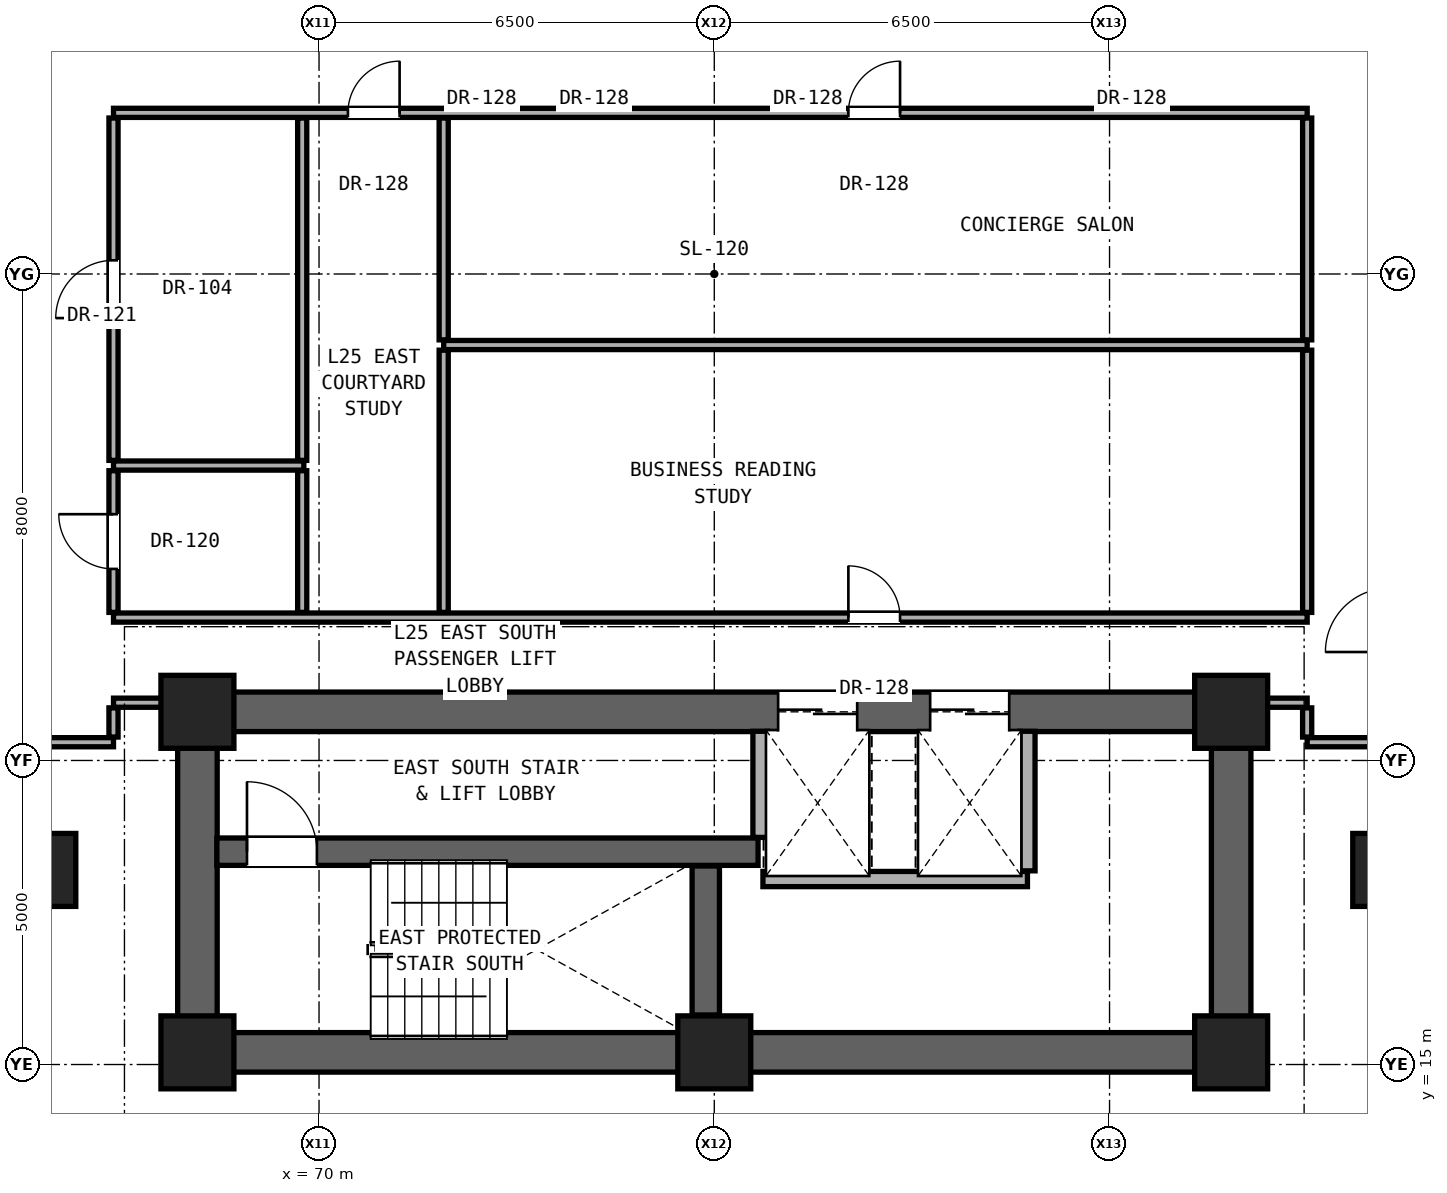
"""IFC4 building model, lengths in metres.
Left out: names, types, materials, properties, quantities, classifications, styles, units other than length and angle.
Written with IfcOpenShell. Run it as: python <this file> out.ifc"""

import sys

from ifc_helpers import new_model, si_unit, direction, frame, frame_2d, origin, origin_2d, place, context, subcontext, project, spatial, rectangle, extrude, element, fill, save


model = new_model("IFC4")
c1 = context("Model", 3, precision=1e-05, world=origin(), true_north=direction((0.0, 1.0)))
c2 = subcontext(c1, "Body", "Model", "MODEL_VIEW")
j1 = project(units=[si_unit("LENGTHUNIT", "METRE"), si_unit("PLANEANGLEUNIT", "RADIAN")], contexts=[c1])
p1 = place(None, origin())
s1 = spatial("IfcSite", under=j1, at=p1, CompositionType="ELEMENT")
p2 = place(p1, origin())
s2 = spatial("IfcBuilding", under=s1, at=p2, CompositionType="ELEMENT")
p3 = place(p2, frame((0.0, 0.0, 91.7)))
s3 = spatial("IfcBuildingStorey", under=s2, at=p3, CompositionType="ELEMENT", Elevation=91.7)
for number, where, z_axis, x_axis in (
    (1, (68.0, 15.2, 0.0), (0.0, 0.0, 1.0), (1.0, 0.0, 0.0)),
    (2, (76.5, 15.2, 0.0), (0.0, 0.0, 1.0), (1.0, 0.0, 0.0)),
    (3, (85.0, 15.2, 0.0), (0.0, 0.0, 1.0), (1.0, 0.0, 0.0)),
    (4, (68.0, 20.8, 0.0), (0.0, 0.0, 1.0), (1.0, 0.0, 0.0)),
    (5, (85.0, 20.8, 0.0), (0.0, 0.0, 1.0), (1.0, 0.0, 0.0)),
):
    element("IfcColumn", number, at=place(p3, frame(where, z_axis=z_axis, x_axis=x_axis)), inside=s3, PredefinedType="COLUMN", context=c2, shape_type="SweptSolid", body=[
        extrude(rectangle(XDim=1.2, YDim=1.2, at=origin_2d()), origin(), (0.0, 0.0, 1.0), 3.3),
    ])
for number, where, z_axis, x_axis in (
    (6, (65.6, 18.2, 0.0), (0.0, 0.0, 1.0), (1.0, 0.0, 0.0)),
    (7, (87.4, 18.2, 0.0), (0.0, 0.0, 1.0), (1.0, 0.0, 0.0)),
):
    element("IfcColumn", number, at=place(p3, frame(where, z_axis=z_axis, x_axis=x_axis)), inside=s3, PredefinedType="PILASTER", context=c2, shape_type="SweptSolid", body=[
        extrude(rectangle(XDim=0.8, YDim=1.2, at=origin_2d()), origin(), (0.0, 0.0, 1.0), 3.3),
    ])
p4 = place(p3, frame((68.0, 15.2, 0.0), z_axis=(0.0, 0.0, 1.0), x_axis=(1.0, 0.0, 0.0)))
e8 = element("IfcWall", 8, at=p4, inside=s3, PredefinedType="SHEAR", context=c2, shape_type="SweptSolid", body=[
    extrude(rectangle(XDim=17.0, YDim=0.65, at=frame_2d((8.5, 0.0))), origin(), (0.0, 0.0, 1.0), 3.08),
])
for number, where, z_axis, x_axis in (
    (9, (68.0, 15.2, 0.0), (0.0, 0.0, 1.0), (0.0, 1.0, 0.0)),
    (10, (85.0, 15.2, 0.0), (0.0, 0.0, 1.0), (0.0, 1.0, 0.0)),
):
    element("IfcWall", number, at=place(p3, frame(where, z_axis=z_axis, x_axis=x_axis)), inside=s3, PredefinedType="SHEAR", context=c2, shape_type="SweptSolid", body=[
        extrude(rectangle(XDim=5.6, YDim=0.65, at=frame_2d((2.8, 0.0))), origin(), (0.0, 0.0, 1.0), 3.08),
    ])
p5 = place(p3, frame((68.0, 20.8, 0.0), z_axis=(0.0, 0.0, 1.0), x_axis=(1.0, 0.0, 0.0)))
e11 = element("IfcWall", 11, at=p5, inside=s3, PredefinedType="SHEAR", context=c2, shape_type="SweptSolid", body=[
    extrude(rectangle(XDim=17.0, YDim=0.65, at=frame_2d((8.5, 0.0))), origin(), (0.0, 0.0, 1.0), 3.08),
])
p6 = place(p5, frame((9.55, 0.0, 0.0)))
e12 = element("IfcOpeningElement", 12, at=p6, cuts=e11, PredefinedType="OPENING", context=c2, shape_type="SweptSolid", body=[
    extrude(rectangle(XDim=1.3, YDim=2.3, at=frame_2d((0.65, 1.15))), frame((0.0, 0.335, 0.0), z_axis=(0.0, -1.0, 0.0), x_axis=(1.0, 0.0, 0.0)), (0.0, 0.0, 1.0), 0.67),
])
p7 = place(p5, frame((12.05, 0.0, 0.0)))
e13 = element("IfcOpeningElement", 13, at=p7, cuts=e11, PredefinedType="OPENING", context=c2, shape_type="SweptSolid", body=[
    extrude(rectangle(XDim=1.3, YDim=2.3, at=frame_2d((0.65, 1.15))), frame((0.0, 0.335, 0.0), z_axis=(0.0, -1.0, 0.0), x_axis=(1.0, 0.0, 0.0)), (0.0, 0.0, 1.0), 0.67),
])
p8 = place(p3, frame((77.3, 18.05, 0.0), z_axis=(0.0, 0.0, 1.0), x_axis=(1.0, 0.0, 0.0)))
e14 = element("IfcWall", 14, at=p8, inside=s3, PredefinedType="SOLIDWALL", context=c2, shape_type="SweptSolid", body=[
    extrude(rectangle(XDim=4.35, YDim=0.25, at=frame_2d((2.175, 0.0))), origin(), (0.0, 0.0, 1.0), 3.08),
])
p9 = place(p3, frame((68.32, 18.5, 0.0), z_axis=(0.0, 0.0, 1.0), x_axis=(1.0, 0.0, 0.0)))
e15 = element("IfcWall", 15, at=p9, inside=s3, PredefinedType="SHEAR", context=c2, shape_type="SweptSolid", body=[
    extrude(rectangle(XDim=8.9, YDim=0.45, at=frame_2d((4.45, 0.0))), origin(), (0.0, 0.0, 1.0), 3.08),
])
p10 = place(p9, frame((0.495, 0.0, 0.0)))
e16 = element("IfcOpeningElement", 16, at=p10, cuts=e15, PredefinedType="OPENING", context=c2, shape_type="SweptSolid", body=[
    extrude(rectangle(XDim=1.15, YDim=2.2, at=frame_2d((0.575, 1.1))), frame((0.0, 0.235, 0.0), z_axis=(0.0, -1.0, 0.0), x_axis=(1.0, 0.0, 0.0)), (0.0, 0.0, 1.0), 0.47),
])
p11 = place(p3, frame((65.25, 20.3, 0.0), z_axis=(0.0, 0.0, 1.0), x_axis=(1.0, 0.0, 0.0)))
e17 = element("IfcWall", 17, at=p11, inside=s3, PredefinedType="PARTITIONING", context=c2, shape_type="SweptSolid", body=[
    extrude(rectangle(XDim=1.37, YDim=0.15, at=frame_2d((0.685, 0.0))), origin(), (0.0, 0.0, 1.0), 3.08),
])
p12 = place(p3, frame((86.25, 20.3, 0.0), z_axis=(0.0, 0.0, 1.0), x_axis=(1.0, 0.0, 0.0)))
e18 = element("IfcWall", 18, at=p12, inside=s3, PredefinedType="PARTITIONING", context=c2, shape_type="SweptSolid", body=[
    extrude(rectangle(XDim=1.35, YDim=0.15, at=frame_2d((0.675, 0.0))), origin(), (0.0, 0.0, 1.0), 3.08),
])
p13 = place(p3, frame((66.62, 20.95, 0.0), z_axis=(0.0, 0.0, 1.0), x_axis=(1.0, 0.0, 0.0)))
e19 = element("IfcWall", 19, at=p13, inside=s3, PredefinedType="PARTITIONING", context=c2, shape_type="SweptSolid", body=[
    extrude(rectangle(XDim=1.06, YDim=0.15, at=frame_2d((0.53, 0.0))), origin(), (0.0, 0.0, 1.0), 2.472),
])
p14 = place(p3, frame((85.32, 20.95, 0.0), z_axis=(0.0, 0.0, 1.0), x_axis=(1.0, 0.0, 0.0)))
e20 = element("IfcWall", 20, at=p14, inside=s3, PredefinedType="PARTITIONING", context=c2, shape_type="SweptSolid", body=[
    extrude(rectangle(XDim=0.93, YDim=0.15, at=frame_2d((0.465, 0.0))), origin(), (0.0, 0.0, 1.0), 2.472),
])
p15 = place(p3, frame((66.62, 22.35, 0.0), z_axis=(0.0, 0.0, 1.0), x_axis=(1.0, 0.0, 0.0)))
e21 = element("IfcWall", 21, at=p15, inside=s3, PredefinedType="PARTITIONING", context=c2, shape_type="SweptSolid", body=[
    extrude(rectangle(XDim=19.63, YDim=0.15, at=frame_2d((9.815, 0.0))), origin(), (0.0, 0.0, 1.0), 2.145),
])
p16 = place(p15, frame((12.085, 0.0, 0.0)))
e22 = element("IfcOpeningElement", 22, at=p16, cuts=e21, PredefinedType="OPENING", context=c2, shape_type="SweptSolid", body=[
    extrude(rectangle(XDim=0.85, YDim=2.01, at=frame_2d((0.425, 1.005))), frame((0.0, 0.085, 0.0), z_axis=(0.0, -1.0, 0.0), x_axis=(1.0, 0.0, 0.0)), (0.0, 0.0, 1.0), 0.17),
])
p17 = place(p3, frame((66.62, 24.85, 0.0), z_axis=(0.0, 0.0, 1.0), x_axis=(1.0, 0.0, 0.0)))
e23 = element("IfcWall", 23, at=p17, inside=s3, PredefinedType="PARTITIONING", context=c2, shape_type="SweptSolid", body=[
    extrude(rectangle(XDim=3.13, YDim=0.15, at=frame_2d((1.565, 0.0))), origin(), (0.0, 0.0, 1.0), 2.145),
])
p18 = place(p3, frame((72.05, 26.832, 0.0), z_axis=(0.0, 0.0, 1.0), x_axis=(1.0, 0.0, 0.0)))
e24 = element("IfcWall", 24, at=p18, inside=s3, PredefinedType="PARTITIONING", context=c2, shape_type="SweptSolid", body=[
    extrude(rectangle(XDim=14.2, YDim=0.15, at=frame_2d((7.1, 0.0))), origin(), (0.0, 0.0, 1.0), 2.145),
])
p19 = place(p3, frame((66.62, 30.65, 0.0), z_axis=(0.0, 0.0, 1.0), x_axis=(1.0, 0.0, 0.0)))
e25 = element("IfcWall", 25, at=p19, inside=s3, PredefinedType="PARTITIONING", context=c2, shape_type="SweptSolid", body=[
    extrude(rectangle(XDim=19.63, YDim=0.15, at=frame_2d((9.815, 0.0))), origin(), (0.0, 0.0, 1.0), 2.145),
])
p20 = place(p19, frame((3.855, 0.0, 0.0)))
e26 = element("IfcOpeningElement", 26, at=p20, cuts=e25, PredefinedType="OPENING", context=c2, shape_type="SweptSolid", body=[
    extrude(rectangle(XDim=0.85, YDim=2.01, at=frame_2d((0.425, 1.005))), frame((0.0, 0.085, 0.0), z_axis=(0.0, -1.0, 0.0), x_axis=(1.0, 0.0, 0.0)), (0.0, 0.0, 1.0), 0.17),
])
p21 = place(p19, frame((12.085, 0.0, 0.0)))
e27 = element("IfcOpeningElement", 27, at=p21, cuts=e25, PredefinedType="OPENING", context=c2, shape_type="SweptSolid", body=[
    extrude(rectangle(XDim=0.85, YDim=2.01, at=frame_2d((0.425, 1.005))), frame((0.0, 0.085, 0.0), z_axis=(0.0, -1.0, 0.0), x_axis=(1.0, 0.0, 0.0)), (0.0, 0.0, 1.0), 0.17),
])
p22 = place(p3, frame((66.62, 20.385, 0.0), z_axis=(0.0, 0.0, 1.0), x_axis=(0.0, 1.0, 0.0)))
e28 = element("IfcWall", 28, at=p22, inside=s3, PredefinedType="PARTITIONING", context=c2, shape_type="SweptSolid", body=[
    extrude(rectangle(XDim=0.48, YDim=0.15, at=frame_2d((0.24, 0.0))), origin(), (0.0, 0.0, 1.0), 2.472),
])
p23 = place(p3, frame((66.62, 22.435, 0.0), z_axis=(0.0, 0.0, 1.0), x_axis=(0.0, 1.0, 0.0)))
e29 = element("IfcWall", 29, at=p23, inside=s3, PredefinedType="PARTITIONING", context=c2, shape_type="SweptSolid", body=[
    extrude(rectangle(XDim=2.33, YDim=0.15, at=frame_2d((1.165, 0.0))), origin(), (0.0, 0.0, 1.0), 3.08),
])
p24 = place(p23, frame((0.715, 0.0, 0.0)))
e30 = element("IfcOpeningElement", 30, at=p24, cuts=e29, PredefinedType="OPENING", context=c2, shape_type="SweptSolid", body=[
    extrude(rectangle(XDim=0.9, YDim=2.1, at=frame_2d((0.45, 1.05))), frame((0.0, 0.085, 0.0), z_axis=(0.0, -1.0, 0.0), x_axis=(1.0, 0.0, 0.0)), (0.0, 0.0, 1.0), 0.17),
])
p25 = place(p3, frame((66.62, 24.935, 0.0), z_axis=(0.0, 0.0, 1.0), x_axis=(0.0, 1.0, 0.0)))
e31 = element("IfcWall", 31, at=p25, inside=s3, PredefinedType="PARTITIONING", context=c2, shape_type="SweptSolid", body=[
    extrude(rectangle(XDim=5.63, YDim=0.15, at=frame_2d((2.815, 0.0))), origin(), (0.0, 0.0, 1.0), 2.299),
])
p26 = place(p25, frame((2.34, 0.0, 0.0)))
e32 = element("IfcOpeningElement", 32, at=p26, cuts=e31, PredefinedType="OPENING", context=c2, shape_type="SweptSolid", body=[
    extrude(rectangle(XDim=0.95, YDim=2.15, at=frame_2d((0.475, 1.075))), frame((0.0, 0.085, 0.0), z_axis=(0.0, -1.0, 0.0), x_axis=(1.0, 0.0, 0.0)), (0.0, 0.0, 1.0), 0.17),
])
p27 = place(p3, frame((69.723, 22.435, 0.0), z_axis=(0.0, 0.0, 1.0), x_axis=(0.0, 1.0, 0.0)))
e33 = element("IfcWall", 33, at=p27, inside=s3, PredefinedType="PARTITIONING", context=c2, shape_type="SweptSolid", body=[
    extrude(rectangle(XDim=2.33, YDim=0.15, at=frame_2d((1.165, 0.0))), origin(), (0.0, 0.0, 1.0), 3.08),
])
p28 = place(p3, frame((69.723, 24.935, 0.0), z_axis=(0.0, 0.0, 1.0), x_axis=(0.0, 1.0, 0.0)))
e34 = element("IfcWall", 34, at=p28, inside=s3, PredefinedType="PARTITIONING", context=c2, shape_type="SweptSolid", body=[
    extrude(rectangle(XDim=5.63, YDim=0.15, at=frame_2d((2.815, 0.0))), origin(), (0.0, 0.0, 1.0), 2.145),
])
p29 = place(p3, frame((72.05, 22.435, 0.0), z_axis=(0.0, 0.0, 1.0), x_axis=(0.0, 1.0, 0.0)))
e35 = element("IfcWall", 35, at=p29, inside=s3, PredefinedType="PARTITIONING", context=c2, shape_type="SweptSolid", body=[
    extrude(rectangle(XDim=4.312, YDim=0.15, at=frame_2d((2.156, 0.0))), origin(), (0.0, 0.0, 1.0), 2.609),
])
p30 = place(p3, frame((72.05, 26.917, 0.0), z_axis=(0.0, 0.0, 1.0), x_axis=(0.0, 1.0, 0.0)))
e36 = element("IfcWall", 36, at=p30, inside=s3, PredefinedType="PARTITIONING", context=c2, shape_type="SweptSolid", body=[
    extrude(rectangle(XDim=3.648, YDim=0.15, at=frame_2d((1.824, 0.0))), origin(), (0.0, 0.0, 1.0), 2.145),
])
p31 = place(p3, frame((76.36, 15.815, 0.0), z_axis=(0.0, 0.0, 1.0), x_axis=(0.0, 1.0, 0.0)))
e37 = element("IfcWall", 37, at=p31, inside=s3, PredefinedType="SHEAR", context=c2, shape_type="SweptSolid", body=[
    extrude(rectangle(XDim=2.45, YDim=0.45, at=frame_2d((1.225, 0.0))), origin(), (0.0, 0.0, 1.0), 3.08),
])
p32 = place(p3, frame((77.26, 18.735, 0.0), z_axis=(0.0, 0.0, 1.0), x_axis=(0.0, 1.0, 0.0)))
e38 = element("IfcWall", 38, at=p32, inside=s3, PredefinedType="SOLIDWALL", context=c2, shape_type="SweptSolid", body=[
    extrude(rectangle(XDim=1.745, YDim=0.25, at=frame_2d((0.873, 0.0))), origin(), (0.0, 0.0, 1.0), 3.08),
])
p33 = place(p3, frame((81.65, 18.185, 0.0), z_axis=(0.0, 0.0, 1.0), x_axis=(0.0, 1.0, 0.0)))
e39 = element("IfcWall", 39, at=p33, inside=s3, PredefinedType="SOLIDWALL", context=c2, shape_type="SweptSolid", body=[
    extrude(rectangle(XDim=2.295, YDim=0.25, at=frame_2d((1.147, 0.0))), origin(), (0.0, 0.0, 1.0), 3.08),
])
p34 = place(p3, frame((86.25, 20.385, 0.0), z_axis=(0.0, 0.0, 1.0), x_axis=(0.0, 1.0, 0.0)))
e40 = element("IfcWall", 40, at=p34, inside=s3, PredefinedType="PARTITIONING", context=c2, shape_type="SweptSolid", body=[
    extrude(rectangle(XDim=0.48, YDim=0.15, at=frame_2d((0.24, 0.0))), origin(), (0.0, 0.0, 1.0), 2.472),
])
p35 = place(p3, frame((86.25, 22.435, 0.0), z_axis=(0.0, 0.0, 1.0), x_axis=(0.0, 1.0, 0.0)))
e41 = element("IfcWall", 41, at=p35, inside=s3, PredefinedType="PARTITIONING", context=c2, shape_type="SweptSolid", body=[
    extrude(rectangle(XDim=4.312, YDim=0.15, at=frame_2d((2.156, 0.0))), origin(), (0.0, 0.0, 1.0), 3.08),
])
p36 = place(p3, frame((86.25, 26.917, 0.0), z_axis=(0.0, 0.0, 1.0), x_axis=(0.0, 1.0, 0.0)))
e42 = element("IfcWall", 42, at=p36, inside=s3, PredefinedType="PARTITIONING", context=c2, shape_type="SweptSolid", body=[
    extrude(rectangle(XDim=3.648, YDim=0.15, at=frame_2d((1.824, 0.0))), origin(), (0.0, 0.0, 1.0), 2.299),
])
p37 = place(p10, origin())
e43 = element("IfcDoor", 43, at=p37, inside=s3, OperationType="SINGLE_SWING_LEFT", PredefinedType="DOOR", context=c2, shape_type="SweptSolid", body=[
    extrude(rectangle(XDim=1.15, YDim=2.2, at=frame_2d((0.575, 1.1))), frame((0.0, 0.025, 0.0), z_axis=(0.0, -1.0, 0.0), x_axis=(1.0, 0.0, 0.0)), (0.0, 0.0, 1.0), 0.05),
])
fill(e16, e43)
p38 = place(p24, origin())
e44 = element("IfcDoor", 44, at=p38, inside=s3, OperationType="SINGLE_SWING_RIGHT", PredefinedType="DOOR", context=c2, shape_type="SweptSolid", body=[
    extrude(rectangle(XDim=0.9, YDim=2.1, at=frame_2d((0.45, 1.05))), frame((0.0, 0.025, 0.0), z_axis=(0.0, -1.0, 0.0), x_axis=(1.0, 0.0, 0.0)), (0.0, 0.0, 1.0), 0.05),
])
fill(e30, e44)
p39 = place(p26, origin())
e45 = element("IfcDoor", 45, at=p39, inside=s3, OperationType="SINGLE_SWING_LEFT", PredefinedType="DOOR", context=c2, shape_type="SweptSolid", body=[
    extrude(rectangle(XDim=0.95, YDim=2.15, at=frame_2d((0.475, 1.075))), frame((0.0, 0.025, 0.0), z_axis=(0.0, -1.0, 0.0), x_axis=(1.0, 0.0, 0.0)), (0.0, 0.0, 1.0), 0.05),
])
fill(e32, e45)
p40 = place(p20, origin())
e46 = element("IfcDoor", 46, at=p40, inside=s3, OperationType="SINGLE_SWING_RIGHT", PredefinedType="DOOR", context=c2, shape_type="SweptSolid", body=[
    extrude(rectangle(XDim=0.85, YDim=2.01, at=frame_2d((0.425, 1.005))), frame((0.0, 0.025, 0.0), z_axis=(0.0, -1.0, 0.0), x_axis=(1.0, 0.0, 0.0)), (0.0, 0.0, 1.0), 0.05),
])
fill(e26, e46)
p41 = place(p16, origin())
e47 = element("IfcDoor", 47, at=p41, inside=s3, OperationType="SINGLE_SWING_LEFT", PredefinedType="DOOR", context=c2, shape_type="SweptSolid", body=[
    extrude(rectangle(XDim=0.85, YDim=2.01, at=frame_2d((0.425, 1.005))), frame((0.0, 0.025, 0.0), z_axis=(0.0, -1.0, 0.0), x_axis=(1.0, 0.0, 0.0)), (0.0, 0.0, 1.0), 0.05),
])
fill(e22, e47)
p42 = place(p21, origin())
e48 = element("IfcDoor", 48, at=p42, inside=s3, OperationType="SINGLE_SWING_RIGHT", PredefinedType="DOOR", context=c2, shape_type="SweptSolid", body=[
    extrude(rectangle(XDim=0.85, YDim=2.01, at=frame_2d((0.425, 1.005))), frame((0.0, 0.025, 0.0), z_axis=(0.0, -1.0, 0.0), x_axis=(1.0, 0.0, 0.0)), (0.0, 0.0, 1.0), 0.05),
])
fill(e27, e48)
p43 = place(p6, origin())
e49 = element("IfcDoor", 49, at=p43, inside=s3, OperationType="DOUBLE_DOOR_SLIDING", PredefinedType="DOOR", context=c2, shape_type="SweptSolid", body=[
    extrude(rectangle(XDim=1.3, YDim=2.3, at=frame_2d((0.65, 1.15))), frame((0.0, 0.025, 0.0), z_axis=(0.0, -1.0, 0.0), x_axis=(1.0, 0.0, 0.0)), (0.0, 0.0, 1.0), 0.05),
])
fill(e12, e49)
p44 = place(p7, origin())
e50 = element("IfcDoor", 50, at=p44, inside=s3, OperationType="DOUBLE_DOOR_SLIDING", PredefinedType="DOOR", context=c2, shape_type="SweptSolid", body=[
    extrude(rectangle(XDim=1.3, YDim=2.3, at=frame_2d((0.65, 1.15))), frame((0.0, 0.025, 0.0), z_axis=(0.0, -1.0, 0.0), x_axis=(1.0, 0.0, 0.0)), (0.0, 0.0, 1.0), 0.05),
])
fill(e13, e50)
save(model, sys.argv[1])
